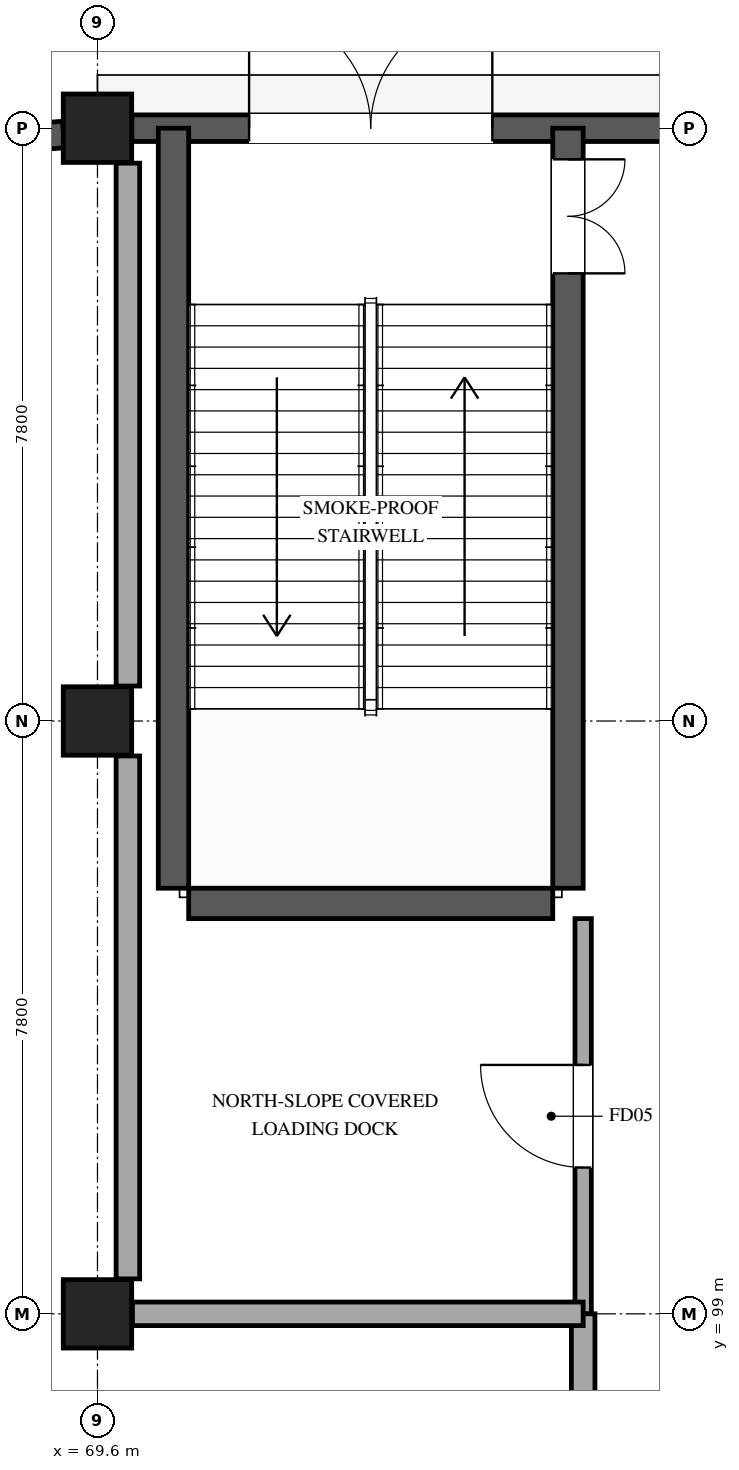
"""IFC4 building model, lengths in metres.
Left out: names, types, materials, properties, quantities, classifications, styles, units other than length and angle.
Written with IfcOpenShell. Run it as: python <this file> out.ifc"""

import sys

from ifc_helpers import new_model, si_unit, direction, frame, frame_2d, origin, origin_2d, place, context, subcontext, project, spatial, rectangle, extrude, element, fill, save


model = new_model("IFC4")
c1 = context("Model", 3, precision=1e-05, world=origin(), true_north=direction((0.0, 1.0)))
c2 = subcontext(c1, "Body", "Model", "MODEL_VIEW")
j1 = project(units=[si_unit("LENGTHUNIT", "METRE"), si_unit("PLANEANGLEUNIT", "RADIAN")], contexts=[c1])
p1 = place(None, origin())
s1 = spatial("IfcSite", under=j1, at=p1, CompositionType="ELEMENT")
p2 = place(p1, origin())
s2 = spatial("IfcBuilding", under=s1, at=p2, CompositionType="ELEMENT")
p3 = place(p2, origin())
s3 = spatial("IfcBuildingStorey", under=s2, at=p3, CompositionType="ELEMENT", Elevation=0.0)
for number, where, z_axis, x_axis in (
    (1, (69.6, 99.0, 0.0), (0.0, 0.0, 1.0), (1.0, 0.0, 0.0)),
    (2, (69.6, 106.8, 0.0), (0.0, 0.0, 1.0), (1.0, 0.0, 0.0)),
    (3, (69.6, 114.6, 0.0), (0.0, 0.0, 1.0), (1.0, 0.0, 0.0)),
):
    element("IfcColumn", number, at=place(p3, frame(where, z_axis=z_axis, x_axis=x_axis)), inside=s3, PredefinedType="COLUMN", context=c2, shape_type="SweptSolid", body=[
        extrude(rectangle(XDim=0.9, YDim=0.9, at=origin_2d()), origin(), (0.0, 0.0, 1.0), 6.0),
    ])
p4 = place(p3, frame((67.384, 114.378, 0.0), z_axis=(0.0, 0.0, 1.0), x_axis=(0.996920266217, 0.078421826076, 0.0)))
e4 = element("IfcWall", 4, at=p4, inside=s3, PredefinedType="STANDARD", context=c2, shape_type="SweptSolid", body=[
    extrude(rectangle(XDim=1.774, YDim=0.35, at=frame_2d((0.887, 0.0))), origin(), (0.0, 0.0, 1.0), 5.66),
])
p5 = place(p3, frame((70.052, 114.6, 0.0), z_axis=(0.0, 0.0, 1.0), x_axis=(1.0, 0.0, 0.0)))
e5 = element("IfcWall", 5, at=p5, inside=s3, PredefinedType="STANDARD", context=c2, shape_type="SweptSolid", body=[
    extrude(rectangle(XDim=7.796, YDim=0.35, at=frame_2d((3.898, 0.0))), origin(), (0.0, 0.0, 1.0), 5.66),
])
p6 = place(p5, frame((1.543, 0.0, 0.0)))
e6 = element("IfcOpeningElement", 6, at=p6, cuts=e5, PredefinedType="OPENING", context=c2, shape_type="SweptSolid", body=[
    extrude(rectangle(XDim=3.2, YDim=2.4, at=frame_2d((1.6, 1.2))), frame((0.0, 0.185, 0.0), z_axis=(0.0, -1.0, 0.0), x_axis=(1.0, 0.0, 0.0)), (0.0, 0.0, 1.0), 0.37),
])
p7 = place(p3, frame((70.6, 104.6, 0.0), z_axis=(0.0, 0.0, 1.0), x_axis=(0.0, 1.0, 0.0)))
e7 = element("IfcWall", 7, at=p7, inside=s3, PredefinedType="SHEAR", context=c2, shape_type="SweptSolid", body=[
    extrude(rectangle(XDim=10.0, YDim=0.4, at=frame_2d((5.0, 0.0))), origin(), (0.0, 0.0, 1.0), 6.0),
])
p8 = place(p3, frame((75.79, 114.6, 0.0), z_axis=(0.0, 0.0, 1.0), x_axis=(0.0, -1.0, 0.0)))
e8 = element("IfcWall", 8, at=p8, inside=s3, PredefinedType="SHEAR", context=c2, shape_type="SweptSolid", body=[
    extrude(rectangle(XDim=10.0, YDim=0.4, at=frame_2d((5.0, 0.0))), origin(), (0.0, 0.0, 1.0), 6.0),
])
p9 = place(p8, frame((0.41, 0.0, 0.0)))
e9 = element("IfcOpeningElement", 9, at=p9, cuts=e8, PredefinedType="OPENING", context=c2, shape_type="SweptSolid", body=[
    extrude(rectangle(XDim=1.5, YDim=2.2, at=frame_2d((0.75, 1.1))), frame((0.0, 0.21, 0.0), z_axis=(0.0, -1.0, 0.0), x_axis=(1.0, 0.0, 0.0)), (0.0, 0.0, 1.0), 0.42),
])
p10 = place(p3, frame((75.59, 104.4, 0.0), z_axis=(0.0, 0.0, 1.0), x_axis=(-1.0, 0.0, 0.0)))
e10 = element("IfcWall", 10, at=p10, inside=s3, PredefinedType="SHEAR", context=c2, shape_type="SweptSolid", body=[
    extrude(rectangle(XDim=4.79, YDim=0.4, at=frame_2d((2.395, 0.0))), origin(), (0.0, 0.0, 1.0), 6.0),
])
p11 = place(p3, frame((75.99, 99.0, 0.0), z_axis=(0.0, 0.0, 1.0), x_axis=(0.0, 1.0, 0.0)))
e11 = element("IfcWall", 11, at=p11, inside=s3, PredefinedType="PARTITIONING", context=c2, shape_type="SweptSolid", body=[
    extrude(rectangle(XDim=5.2, YDim=0.215, at=frame_2d((2.6, 0.0))), origin(), (0.0, 0.0, 1.0), 4.88),
])
p12 = place(p11, frame((1.925, 0.0, 0.0)))
e12 = element("IfcOpeningElement", 12, at=p12, cuts=e11, PredefinedType="OPENING", context=c2, shape_type="SweptSolid", body=[
    extrude(rectangle(XDim=1.35, YDim=2.2, at=frame_2d((0.675, 1.1))), frame((0.0, 0.118, 0.0), z_axis=(0.0, -1.0, 0.0), x_axis=(1.0, 0.0, 0.0)), (0.0, 0.0, 1.0), 0.235),
])
p13 = place(p3, frame((75.99, 94.8, 0.0), z_axis=(0.0, 0.0, 1.0), x_axis=(0.0, 1.0, 0.0)))
e13 = element("IfcWall", 13, at=p13, inside=s3, PredefinedType="STANDARD", context=c2, shape_type="SweptSolid", body=[
    extrude(rectangle(XDim=4.2, YDim=0.31, at=frame_2d((2.1, 0.0))), origin(), (0.0, 0.0, 1.0), 4.88),
])
p14 = place(p3, frame((75.99, 99.0, 0.0), z_axis=(0.0, 0.0, 1.0), x_axis=(-1.0, 0.0, 0.0)))
e14 = element("IfcWall", 14, at=p14, inside=s3, PredefinedType="STANDARD", context=c2, shape_type="SweptSolid", body=[
    extrude(rectangle(XDim=5.93, YDim=0.31, at=frame_2d((2.965, 0.0))), origin(), (0.0, 0.0, 1.0), 4.88),
])
p15 = place(p3, frame((70.0, 99.46, 0.0), z_axis=(0.0, 0.0, 1.0), x_axis=(0.0, 1.0, 0.0)))
e15 = element("IfcWall", 15, at=p15, inside=s3, PredefinedType="STANDARD", context=c2, shape_type="SweptSolid", body=[
    extrude(rectangle(XDim=6.88, YDim=0.31, at=frame_2d((3.44, 0.0))), origin(), (0.0, 0.0, 1.0), 5.66),
])
p16 = place(p3, frame((70.0, 107.26, 0.0), z_axis=(0.0, 0.0, 1.0), x_axis=(0.0, 1.0, 0.0)))
e16 = element("IfcWall", 16, at=p16, inside=s3, PredefinedType="STANDARD", context=c2, shape_type="SweptSolid", body=[
    extrude(rectangle(XDim=6.88, YDim=0.31, at=frame_2d((3.44, 0.0))), origin(), (0.0, 0.0, 1.0), 5.66),
])
p17 = place(p6, origin())
e17 = element("IfcDoor", 17, at=p17, inside=s3, OperationType="DOUBLE_DOOR_SINGLE_SWING", PredefinedType="USERDEFINED", context=c2, shape_type="SweptSolid", body=[
    extrude(rectangle(XDim=3.2, YDim=2.4, at=frame_2d((1.6, 1.2))), frame((0.0, 0.025, 0.0), z_axis=(0.0, -1.0, 0.0), x_axis=(1.0, 0.0, 0.0)), (0.0, 0.0, 1.0), 0.05),
])
fill(e6, e17)
p18 = place(p9, origin())
e18 = element("IfcDoor", 18, at=p18, inside=s3, OperationType="DOUBLE_DOOR_SINGLE_SWING", PredefinedType="DOOR", context=c2, shape_type="SweptSolid", body=[
    extrude(rectangle(XDim=1.5, YDim=2.2, at=frame_2d((0.75, 1.1))), frame((0.0, 0.025, 0.0), z_axis=(0.0, -1.0, 0.0), x_axis=(1.0, 0.0, 0.0)), (0.0, 0.0, 1.0), 0.05),
])
fill(e9, e18)
p19 = place(p12, origin())
e19 = element("IfcDoor", 19, at=p19, inside=s3, OperationType="SINGLE_SWING_RIGHT", PredefinedType="DOOR", context=c2, shape_type="SweptSolid", body=[
    extrude(rectangle(XDim=1.35, YDim=2.2, at=frame_2d((0.675, 1.1))), frame((0.0, 0.025, 0.0), z_axis=(0.0, -1.0, 0.0), x_axis=(1.0, 0.0, 0.0)), (0.0, 0.0, 1.0), 0.05),
])
fill(e12, e19)
save(model, sys.argv[1])
